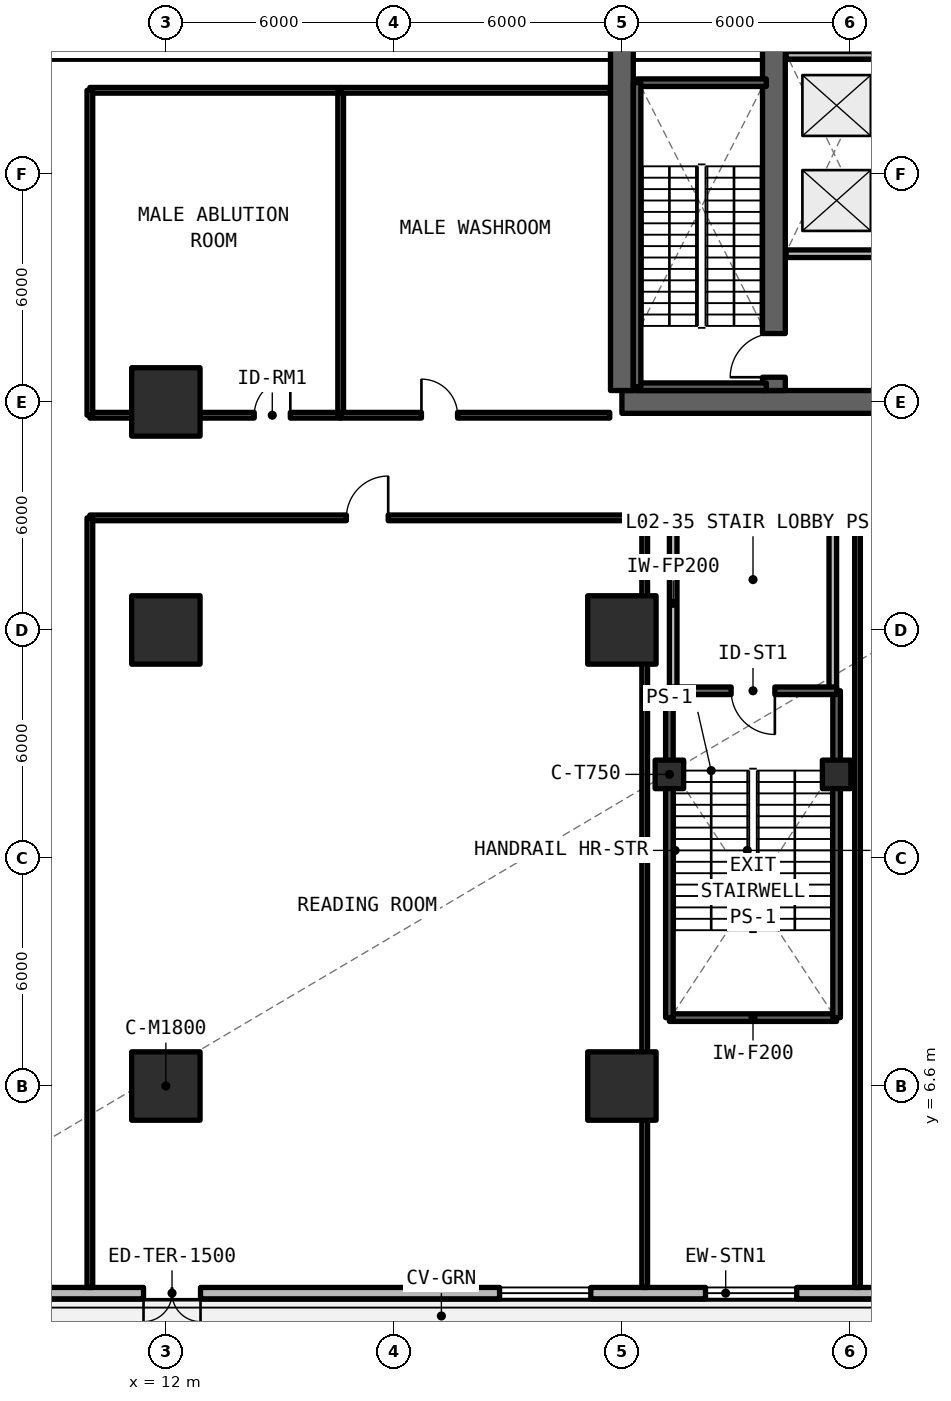
"""IFC4 building model, lengths in metres.
Left out: names, types, materials, properties, quantities, classifications, styles, units other than length and angle.
Written with IfcOpenShell. Run it as: python <this file> out.ifc"""

import sys

from ifc_helpers import new_model, si_unit, direction, frame, frame_2d, origin, origin_2d, place, context, subcontext, project, spatial, rectangle, extrude, element, fill, save


model = new_model("IFC4")
c1 = context("Model", 3, precision=1e-05, world=origin(), true_north=direction((0.0, 1.0)))
c2 = subcontext(c1, "Body", "Model", "MODEL_VIEW")
j1 = project(units=[si_unit("LENGTHUNIT", "METRE"), si_unit("PLANEANGLEUNIT", "RADIAN")], contexts=[c1])
p1 = place(None, origin())
s1 = spatial("IfcSite", under=j1, at=p1, CompositionType="ELEMENT")
p2 = place(p1, origin())
s2 = spatial("IfcBuilding", under=s1, at=p2, CompositionType="ELEMENT")
p3 = place(p2, frame((0.0, 0.0, 4.95)))
s3 = spatial("IfcBuildingStorey", under=s2, at=p3, CompositionType="ELEMENT", Elevation=4.95)
p4 = place(p3, frame((24.0, 24.6, 0.0), z_axis=(0.0, 0.0, 1.0), x_axis=(1.0, 0.0, 0.0)))
e1 = element("IfcWall", 1, at=p4, inside=s3, PredefinedType="SHEAR", context=c2, shape_type="SweptSolid", body=[
    extrude(rectangle(XDim=12.0, YDim=0.6, at=frame_2d((6.0, 0.0))), origin(), (0.0, 0.0, 1.0), 4.95),
])
p5 = place(p3, frame((24.0, 24.9, 0.0), z_axis=(0.0, 0.0, 1.0), x_axis=(0.0, 1.0, 0.0)))
e2 = element("IfcWall", 2, at=p5, inside=s3, PredefinedType="SHEAR", context=c2, shape_type="SweptSolid", body=[
    extrude(rectangle(XDim=17.4, YDim=0.6, at=frame_2d((8.7, 0.0))), origin(), (0.0, 0.0, 1.0), 4.95),
])
p6 = place(p3, frame((28.0, 24.9, 0.0), z_axis=(0.0, 0.0, 1.0), x_axis=(0.0, 1.0, 0.0)))
e3 = element("IfcWall", 3, at=p6, inside=s3, PredefinedType="SHEAR", context=c2, shape_type="SweptSolid", body=[
    extrude(rectangle(XDim=17.4, YDim=0.6, at=frame_2d((8.7, 0.0))), origin(), (0.0, 0.0, 1.0), 4.95),
])
p7 = place(p6, frame((0.35, 0.0, 0.0)))
e4 = element("IfcOpeningElement", 4, at=p7, cuts=e3, PredefinedType="OPENING", context=c2, shape_type="SweptSolid", body=[
    extrude(rectangle(XDim=1.15, YDim=2.15, at=frame_2d((0.575, 1.075))), frame((0.0, 0.31, 0.0), z_axis=(0.0, -1.0, 0.0), x_axis=(1.0, 0.0, 0.0)), (0.0, 0.0, 1.0), 0.62),
])
p8 = place(p6, frame((9.55, 0.0, 0.0)))
e5 = element("IfcOpeningElement", 5, at=p8, cuts=e3, PredefinedType="OPENING", context=c2, shape_type="SweptSolid", body=[
    extrude(rectangle(XDim=1.15, YDim=2.15, at=frame_2d((0.575, 1.075))), frame((0.0, 0.31, 0.0), z_axis=(0.0, -1.0, 0.0), x_axis=(1.0, 0.0, 0.0)), (0.0, 0.0, 1.0), 0.62),
])
for number, where, z_axis, x_axis in (
    (6, (12.0, 6.6, 0.0), (0.0, 0.0, 1.0), (1.0, 0.0, 0.0)),
    (7, (12.0, 24.6, 0.0), (0.0, 0.0, 1.0), (1.0, 0.0, 0.0)),
    (8, (24.0, 6.6, 0.0), (0.0, 0.0, 1.0), (1.0, 0.0, 0.0)),
    (9, (12.0, 18.6, 0.0), (0.0, 0.0, 1.0), (1.0, 0.0, 0.0)),
    (10, (24.0, 18.6, 0.0), (0.0, 0.0, 1.0), (1.0, 0.0, 0.0)),
):
    element("IfcColumn", number, at=place(p3, frame(where, z_axis=z_axis, x_axis=x_axis)), inside=s3, PredefinedType="COLUMN", context=c2, shape_type="SweptSolid", body=[
        extrude(rectangle(XDim=1.8, YDim=1.8, at=origin_2d()), origin(), (0.0, 0.0, 1.0), 4.95),
    ])
for number, where, z_axis, x_axis in (
    (11, (25.25, 14.8, 0.0), (0.0, 0.0, 1.0), (1.0, 0.0, 0.0)),
    (12, (29.65, 14.8, 0.0), (0.0, 0.0, 1.0), (1.0, 0.0, 0.0)),
):
    element("IfcColumn", number, at=place(p3, frame(where, z_axis=z_axis, x_axis=x_axis)), inside=s3, PredefinedType="COLUMN", context=c2, shape_type="SweptSolid", body=[
        extrude(rectangle(XDim=0.75, YDim=0.75, at=origin_2d()), origin(), (0.0, 0.0, 1.0), 4.95),
    ])
p9 = place(p3, frame((3.662, 1.15, 0.0), z_axis=(0.0, 0.0, 1.0), x_axis=(1.0, 0.0, 0.0)))
e13 = element("IfcWall", 13, at=p9, inside=s3, PredefinedType="SOLIDWALL", context=c2, shape_type="SweptSolid", body=[
    extrude(rectangle(XDim=46.138, YDim=0.3, at=frame_2d((23.069, 0.0))), origin(), (0.0, 0.0, 1.0), 4.67),
])
p10 = place(p9, frame((7.75, 0.0, 0.0)))
e14 = element("IfcOpeningElement", 14, at=p10, cuts=e13, PredefinedType="OPENING", context=c2, shape_type="SweptSolid", body=[
    extrude(rectangle(XDim=1.5, YDim=2.2, at=frame_2d((0.75, 1.1))), frame((0.0, 0.16, 0.0), z_axis=(0.0, -1.0, 0.0), x_axis=(1.0, 0.0, 0.0)), (0.0, 0.0, 1.0), 0.32),
])
p11 = place(p9, frame((31.788, 0.0, 0.78)))
e15 = element("IfcOpeningElement", 15, at=p11, cuts=e13, PredefinedType="OPENING", context=c2, shape_type="SweptSolid", body=[
    extrude(rectangle(XDim=2.4, YDim=1.66, at=frame_2d((1.2, 0.83))), frame((0.0, 0.16, 0.0), z_axis=(0.0, -1.0, 0.0), x_axis=(1.0, 0.0, 0.0)), (0.0, 0.0, 1.0), 0.32),
])
p12 = place(p9, frame((1.969, 0.0, 0.78)))
e16 = element("IfcOpeningElement", 16, at=p12, cuts=e13, PredefinedType="OPENING", context=c2, shape_type="SweptSolid", body=[
    extrude(rectangle(XDim=2.4, YDim=1.66, at=frame_2d((1.2, 0.83))), frame((0.0, 0.16, 0.0), z_axis=(0.0, -1.0, 0.0), x_axis=(1.0, 0.0, 0.0)), (0.0, 0.0, 1.0), 0.32),
])
p13 = place(p9, frame((22.538, 0.0, 0.78)))
e17 = element("IfcOpeningElement", 17, at=p13, cuts=e13, PredefinedType="OPENING", context=c2, shape_type="SweptSolid", body=[
    extrude(rectangle(XDim=2.4, YDim=1.66, at=frame_2d((1.2, 0.83))), frame((0.0, 0.16, 0.0), z_axis=(0.0, -1.0, 0.0), x_axis=(1.0, 0.0, 0.0)), (0.0, 0.0, 1.0), 0.32),
])
p14 = place(p9, frame((17.119, 0.0, 0.78)))
e18 = element("IfcOpeningElement", 18, at=p14, cuts=e13, PredefinedType="OPENING", context=c2, shape_type="SweptSolid", body=[
    extrude(rectangle(XDim=2.4, YDim=1.66, at=frame_2d((1.2, 0.83))), frame((0.0, 0.16, 0.0), z_axis=(0.0, -1.0, 0.0), x_axis=(1.0, 0.0, 0.0)), (0.0, 0.0, 1.0), 0.32),
])
p15 = place(p9, frame((36.119, 0.0, 0.78)))
e19 = element("IfcOpeningElement", 19, at=p15, cuts=e13, PredefinedType="OPENING", context=c2, shape_type="SweptSolid", body=[
    extrude(rectangle(XDim=2.4, YDim=1.66, at=frame_2d((1.2, 0.83))), frame((0.0, 0.16, 0.0), z_axis=(0.0, -1.0, 0.0), x_axis=(1.0, 0.0, 0.0)), (0.0, 0.0, 1.0), 0.32),
])
p16 = place(p3, frame((28.32, 28.5, 0.0), z_axis=(0.0, 0.0, 1.0), x_axis=(1.0, 0.0, 0.0)))
e20 = element("IfcWall", 20, at=p16, inside=s3, PredefinedType="SOLIDWALL", context=c2, shape_type="SweptSolid", body=[
    extrude(rectangle(XDim=7.36, YDim=0.2, at=frame_2d((3.68, 0.0))), origin(), (0.0, 0.0, 1.0), 3.89),
])
p17 = place(p16, frame((2.88, 0.0, 0.0)))
e21 = element("IfcOpeningElement", 21, at=p17, cuts=e20, PredefinedType="OPENING", context=c2, shape_type="SweptSolid", body=[
    extrude(rectangle(XDim=1.0, YDim=2.15, at=frame_2d((0.5, 1.075))), frame((0.0, 0.11, 0.0), z_axis=(0.0, -1.0, 0.0), x_axis=(1.0, 0.0, 0.0)), (0.0, 0.0, 1.0), 0.22),
])
p18 = place(p3, frame((28.32, 33.72, 0.0), z_axis=(0.0, 0.0, 1.0), x_axis=(1.0, 0.0, 0.0)))
e22 = element("IfcWall", 22, at=p18, inside=s3, PredefinedType="SOLIDWALL", context=c2, shape_type="SweptSolid", body=[
    extrude(rectangle(XDim=2.48, YDim=0.2, at=frame_2d((1.24, 0.0))), origin(), (0.0, 0.0, 1.0), 3.89),
])
for number, where, z_axis, x_axis in (
    (23, (25.35, 17.0, 0.0), (0.0, 0.0, 1.0), (0.0, 1.0, 0.0)),
    (24, (29.55, 17.0, 0.0), (0.0, 0.0, 1.0), (0.0, 1.0, 0.0)),
):
    element("IfcWall", number, at=place(p3, frame(where, z_axis=z_axis, x_axis=x_axis)), inside=s3, PredefinedType="SOLIDWALL", context=c2, shape_type="SweptSolid", body=[
        extrude(rectangle(XDim=4.6, YDim=0.2, at=frame_2d((2.3, 0.0))), origin(), (0.0, 0.0, 1.0), 3.89),
    ])
p19 = place(p3, frame((30.2, 21.55, 0.0), z_axis=(0.0, 0.0, 1.0), x_axis=(1.0, 0.0, 0.0)))
e25 = element("IfcWall", 25, at=p19, inside=s3, PredefinedType="SOLIDWALL", context=c2, shape_type="SweptSolid", body=[
    extrude(rectangle(XDim=12.95, YDim=0.15, at=frame_2d((6.475, 0.0))), origin(), (0.0, 0.0, 1.0), 3.89),
])
p20 = place(p19, frame((6.8, 0.0, 0.0)))
e26 = element("IfcOpeningElement", 26, at=p20, cuts=e25, PredefinedType="OPENING", context=c2, shape_type="SweptSolid", body=[
    extrude(rectangle(XDim=1.4, YDim=2.15, at=frame_2d((0.7, 1.075))), frame((0.0, 0.085, 0.0), z_axis=(0.0, -1.0, 0.0), x_axis=(1.0, 0.0, 0.0)), (0.0, 0.0, 1.0), 0.17),
])
p21 = place(p3, frame((30.2, 1.3, 0.0), z_axis=(0.0, 0.0, 1.0), x_axis=(0.0, 1.0, 0.0)))
e27 = element("IfcWall", 27, at=p21, inside=s3, PredefinedType="SOLIDWALL", context=c2, shape_type="SweptSolid", body=[
    extrude(rectangle(XDim=20.25, YDim=0.15, at=frame_2d((10.125, 0.0))), origin(), (0.0, 0.0, 1.0), 3.89),
])
p22 = place(p3, frame((10.0, 24.25, 0.0), z_axis=(0.0, 0.0, 1.0), x_axis=(1.0, 0.0, 0.0)))
e28 = element("IfcWall", 28, at=p22, inside=s3, PredefinedType="SOLIDWALL", context=c2, shape_type="SweptSolid", body=[
    extrude(rectangle(XDim=6.6, YDim=0.15, at=frame_2d((3.3, 0.0))), origin(), (0.0, 0.0, 1.0), 3.89),
])
p23 = place(p22, frame((4.325, 0.0, 0.0)))
e29 = element("IfcOpeningElement", 29, at=p23, cuts=e28, PredefinedType="OPENING", context=c2, shape_type="SweptSolid", body=[
    extrude(rectangle(XDim=0.95, YDim=2.15, at=frame_2d((0.475, 1.075))), frame((0.0, 0.085, 0.0), z_axis=(0.0, -1.0, 0.0), x_axis=(1.0, 0.0, 0.0)), (0.0, 0.0, 1.0), 0.17),
])
p24 = place(p3, frame((10.0, 32.8, 0.0), z_axis=(0.0, 0.0, 1.0), x_axis=(1.0, 0.0, 0.0)))
e30 = element("IfcWall", 30, at=p24, inside=s3, PredefinedType="SOLIDWALL", context=c2, shape_type="SweptSolid", body=[
    extrude(rectangle(XDim=6.6, YDim=0.15, at=frame_2d((3.3, 0.0))), origin(), (0.0, 0.0, 1.0), 3.89),
])
for number, where, z_axis, x_axis in (
    (31, (10.0, 24.25, 0.0), (0.0, 0.0, 1.0), (0.0, 1.0, 0.0)),
    (32, (16.6, 24.25, 0.0), (0.0, 0.0, 1.0), (0.0, 1.0, 0.0)),
):
    element("IfcWall", number, at=place(p3, frame(where, z_axis=z_axis, x_axis=x_axis)), inside=s3, PredefinedType="SOLIDWALL", context=c2, shape_type="SweptSolid", body=[
        extrude(rectangle(XDim=8.55, YDim=0.15, at=frame_2d((4.275, 0.0))), origin(), (0.0, 0.0, 1.0), 3.89),
    ])
p25 = place(p3, frame((16.6, 24.25, 0.0), z_axis=(0.0, 0.0, 1.0), x_axis=(1.0, 0.0, 0.0)))
e33 = element("IfcWall", 33, at=p25, inside=s3, PredefinedType="SOLIDWALL", context=c2, shape_type="SweptSolid", body=[
    extrude(rectangle(XDim=7.08, YDim=0.15, at=frame_2d((3.54, 0.0))), origin(), (0.0, 0.0, 1.0), 3.89),
])
p26 = place(p25, frame((2.125, 0.0, 0.0)))
e34 = element("IfcOpeningElement", 34, at=p26, cuts=e33, PredefinedType="OPENING", context=c2, shape_type="SweptSolid", body=[
    extrude(rectangle(XDim=0.95, YDim=2.15, at=frame_2d((0.475, 1.075))), frame((0.0, 0.085, 0.0), z_axis=(0.0, -1.0, 0.0), x_axis=(1.0, 0.0, 0.0)), (0.0, 0.0, 1.0), 0.17),
])
p27 = place(p3, frame((16.6, 32.8, 0.0), z_axis=(0.0, 0.0, 1.0), x_axis=(1.0, 0.0, 0.0)))
e35 = element("IfcWall", 35, at=p27, inside=s3, PredefinedType="SOLIDWALL", context=c2, shape_type="SweptSolid", body=[
    extrude(rectangle(XDim=7.08, YDim=0.15, at=frame_2d((3.54, 0.0))), origin(), (0.0, 0.0, 1.0), 3.89),
])
p28 = place(p3, frame((10.0, 21.55, 0.0), z_axis=(0.0, 0.0, 1.0), x_axis=(1.0, 0.0, 0.0)))
e36 = element("IfcWall", 36, at=p28, inside=s3, PredefinedType="SOLIDWALL", context=c2, shape_type="SweptSolid", body=[
    extrude(rectangle(XDim=14.6, YDim=0.15, at=frame_2d((7.3, 0.0))), origin(), (0.0, 0.0, 1.0), 3.89),
])
p29 = place(p28, frame((6.75, 0.0, 0.0)))
e37 = element("IfcOpeningElement", 37, at=p29, cuts=e36, PredefinedType="OPENING", context=c2, shape_type="SweptSolid", body=[
    extrude(rectangle(XDim=1.1, YDim=2.15, at=frame_2d((0.55, 1.075))), frame((0.0, 0.085, 0.0), z_axis=(0.0, -1.0, 0.0), x_axis=(1.0, 0.0, 0.0)), (0.0, 0.0, 1.0), 0.17),
])
for number, where, z_axis, x_axis in (
    (38, (10.0, 1.3, 0.0), (0.0, 0.0, 1.0), (0.0, 1.0, 0.0)),
    (39, (24.6, 1.3, 0.0), (0.0, 0.0, 1.0), (0.0, 1.0, 0.0)),
):
    element("IfcWall", number, at=place(p3, frame(where, z_axis=z_axis, x_axis=x_axis)), inside=s3, PredefinedType="SOLIDWALL", context=c2, shape_type="SweptSolid", body=[
        extrude(rectangle(XDim=20.25, YDim=0.15, at=frame_2d((10.125, 0.0))), origin(), (0.0, 0.0, 1.0), 3.89),
    ])
for number, where, z_axis, x_axis in (
    (40, (24.4, 25.0, 0.0), (0.0, 0.0, 1.0), (1.0, 0.0, 0.0)),
    (41, (27.8, 33.0, 0.0), (0.0, 0.0, 1.0), (-1.0, 0.0, 0.0)),
):
    element("IfcWall", number, at=place(p3, frame(where, z_axis=z_axis, x_axis=x_axis)), inside=s3, PredefinedType="SOLIDWALL", context=c2, shape_type="SweptSolid", body=[
        extrude(rectangle(XDim=3.4, YDim=0.2, at=frame_2d((1.7, 0.0))), origin(), (0.0, 0.0, 1.0), 4.95),
    ])
p30 = place(p3, frame((24.4, 33.0, 0.0), z_axis=(0.0, 0.0, 1.0), x_axis=(0.0, -1.0, 0.0)))
e42 = element("IfcWall", 42, at=p30, inside=s3, PredefinedType="SOLIDWALL", context=c2, shape_type="SweptSolid", body=[
    extrude(rectangle(XDim=8.0, YDim=0.2, at=frame_2d((4.0, 0.0))), origin(), (0.0, 0.0, 1.0), 4.95),
])
p31 = place(p3, frame((25.25, 8.4, 0.0), z_axis=(0.0, 0.0, 1.0), x_axis=(1.0, 0.0, 0.0)))
e43 = element("IfcWall", 43, at=p31, inside=s3, PredefinedType="SOLIDWALL", context=c2, shape_type="SweptSolid", body=[
    extrude(rectangle(XDim=4.4, YDim=0.2, at=frame_2d((2.2, 0.0))), origin(), (0.0, 0.0, 1.0), 4.95),
])
p32 = place(p3, frame((29.65, 8.4, 0.0), z_axis=(0.0, 0.0, 1.0), x_axis=(0.0, 1.0, 0.0)))
e44 = element("IfcWall", 44, at=p32, inside=s3, PredefinedType="SOLIDWALL", context=c2, shape_type="SweptSolid", body=[
    extrude(rectangle(XDim=8.6, YDim=0.2, at=frame_2d((4.3, 0.0))), origin(), (0.0, 0.0, 1.0), 4.95),
])
p33 = place(p3, frame((29.65, 17.0, 0.0), z_axis=(0.0, 0.0, 1.0), x_axis=(-1.0, 0.0, 0.0)))
e45 = element("IfcWall", 45, at=p33, inside=s3, PredefinedType="SOLIDWALL", context=c2, shape_type="SweptSolid", body=[
    extrude(rectangle(XDim=4.4, YDim=0.2, at=frame_2d((2.2, 0.0))), origin(), (0.0, 0.0, 1.0), 4.95),
])
p34 = place(p33, frame((1.625, 0.0, 0.0)))
e46 = element("IfcOpeningElement", 46, at=p34, cuts=e45, PredefinedType="OPENING", context=c2, shape_type="SweptSolid", body=[
    extrude(rectangle(XDim=1.15, YDim=2.15, at=frame_2d((0.575, 1.075))), frame((0.0, 0.11, 0.0), z_axis=(0.0, -1.0, 0.0), x_axis=(1.0, 0.0, 0.0)), (0.0, 0.0, 1.0), 0.22),
])
p35 = place(p3, frame((25.25, 17.0, 0.0), z_axis=(0.0, 0.0, 1.0), x_axis=(0.0, -1.0, 0.0)))
e47 = element("IfcWall", 47, at=p35, inside=s3, PredefinedType="SOLIDWALL", context=c2, shape_type="SweptSolid", body=[
    extrude(rectangle(XDim=8.6, YDim=0.2, at=frame_2d((4.3, 0.0))), origin(), (0.0, 0.0, 1.0), 4.95),
])
p36 = place(p10, frame((1.5, 0.0, 0.0), z_axis=(0.0, 0.0, 1.0), x_axis=(-1.0, 0.0, 0.0)))
e48 = element("IfcDoor", 48, at=p36, inside=s3, OperationType="SINGLE_SWING_RIGHT", PredefinedType="DOOR", context=c2, shape_type="SweptSolid", body=[
    extrude(rectangle(XDim=1.5, YDim=2.2, at=frame_2d((0.75, 1.1))), frame((0.0, 0.025, 0.0), z_axis=(0.0, -1.0, 0.0), x_axis=(1.0, 0.0, 0.0)), (0.0, 0.0, 1.0), 0.05),
])
fill(e14, e48)
p37 = place(p13, origin())
e49 = element("IfcWindow", 49, at=p37, inside=s3, PartitioningType="SINGLE_PANEL", PredefinedType="WINDOW", context=c2, shape_type="SweptSolid", body=[
    extrude(rectangle(XDim=2.4, YDim=1.66, at=frame_2d((1.2, 0.83))), frame((0.0, 0.03, 0.0), z_axis=(0.0, -1.0, 0.0), x_axis=(1.0, 0.0, 0.0)), (0.0, 0.0, 1.0), 0.06),
])
fill(e17, e49)
p38 = place(p14, origin())
e50 = element("IfcWindow", 50, at=p38, inside=s3, PartitioningType="SINGLE_PANEL", PredefinedType="WINDOW", context=c2, shape_type="SweptSolid", body=[
    extrude(rectangle(XDim=2.4, YDim=1.66, at=frame_2d((1.2, 0.83))), frame((0.0, 0.03, 0.0), z_axis=(0.0, -1.0, 0.0), x_axis=(1.0, 0.0, 0.0)), (0.0, 0.0, 1.0), 0.06),
])
fill(e18, e50)
p39 = place(p23, origin())
e51 = element("IfcDoor", 51, at=p39, inside=s3, OperationType="SINGLE_SWING_RIGHT", PredefinedType="DOOR", context=c2, shape_type="SweptSolid", body=[
    extrude(rectangle(XDim=0.95, YDim=2.15, at=frame_2d((0.475, 1.075))), frame((0.0, 0.025, 0.0), z_axis=(0.0, -1.0, 0.0), x_axis=(1.0, 0.0, 0.0)), (0.0, 0.0, 1.0), 0.05),
])
fill(e29, e51)
p40 = place(p26, origin())
e52 = element("IfcDoor", 52, at=p40, inside=s3, OperationType="SINGLE_SWING_LEFT", PredefinedType="DOOR", context=c2, shape_type="SweptSolid", body=[
    extrude(rectangle(XDim=0.95, YDim=2.15, at=frame_2d((0.475, 1.075))), frame((0.0, 0.025, 0.0), z_axis=(0.0, -1.0, 0.0), x_axis=(1.0, 0.0, 0.0)), (0.0, 0.0, 1.0), 0.05),
])
fill(e34, e52)
p41 = place(p29, origin())
e53 = element("IfcDoor", 53, at=p41, inside=s3, OperationType="SINGLE_SWING_RIGHT", PredefinedType="DOOR", context=c2, shape_type="SweptSolid", body=[
    extrude(rectangle(XDim=1.1, YDim=2.15, at=frame_2d((0.55, 1.075))), frame((0.0, 0.025, 0.0), z_axis=(0.0, -1.0, 0.0), x_axis=(1.0, 0.0, 0.0)), (0.0, 0.0, 1.0), 0.05),
])
fill(e37, e53)
p42 = place(p7, origin())
e54 = element("IfcDoor", 54, at=p42, inside=s3, OperationType="SINGLE_SWING_RIGHT", PredefinedType="DOOR", context=c2, shape_type="SweptSolid", body=[
    extrude(rectangle(XDim=1.15, YDim=2.15, at=frame_2d((0.575, 1.075))), frame((0.0, 0.025, 0.0), z_axis=(0.0, -1.0, 0.0), x_axis=(1.0, 0.0, 0.0)), (0.0, 0.0, 1.0), 0.05),
])
fill(e4, e54)
p43 = place(p34, origin())
e55 = element("IfcDoor", 55, at=p43, inside=s3, OperationType="SINGLE_SWING_RIGHT", PredefinedType="DOOR", context=c2, shape_type="SweptSolid", body=[
    extrude(rectangle(XDim=1.15, YDim=2.15, at=frame_2d((0.575, 1.075))), frame((0.0, 0.025, 0.0), z_axis=(0.0, -1.0, 0.0), x_axis=(1.0, 0.0, 0.0)), (0.0, 0.0, 1.0), 0.05),
])
fill(e46, e55)
save(model, sys.argv[1])
